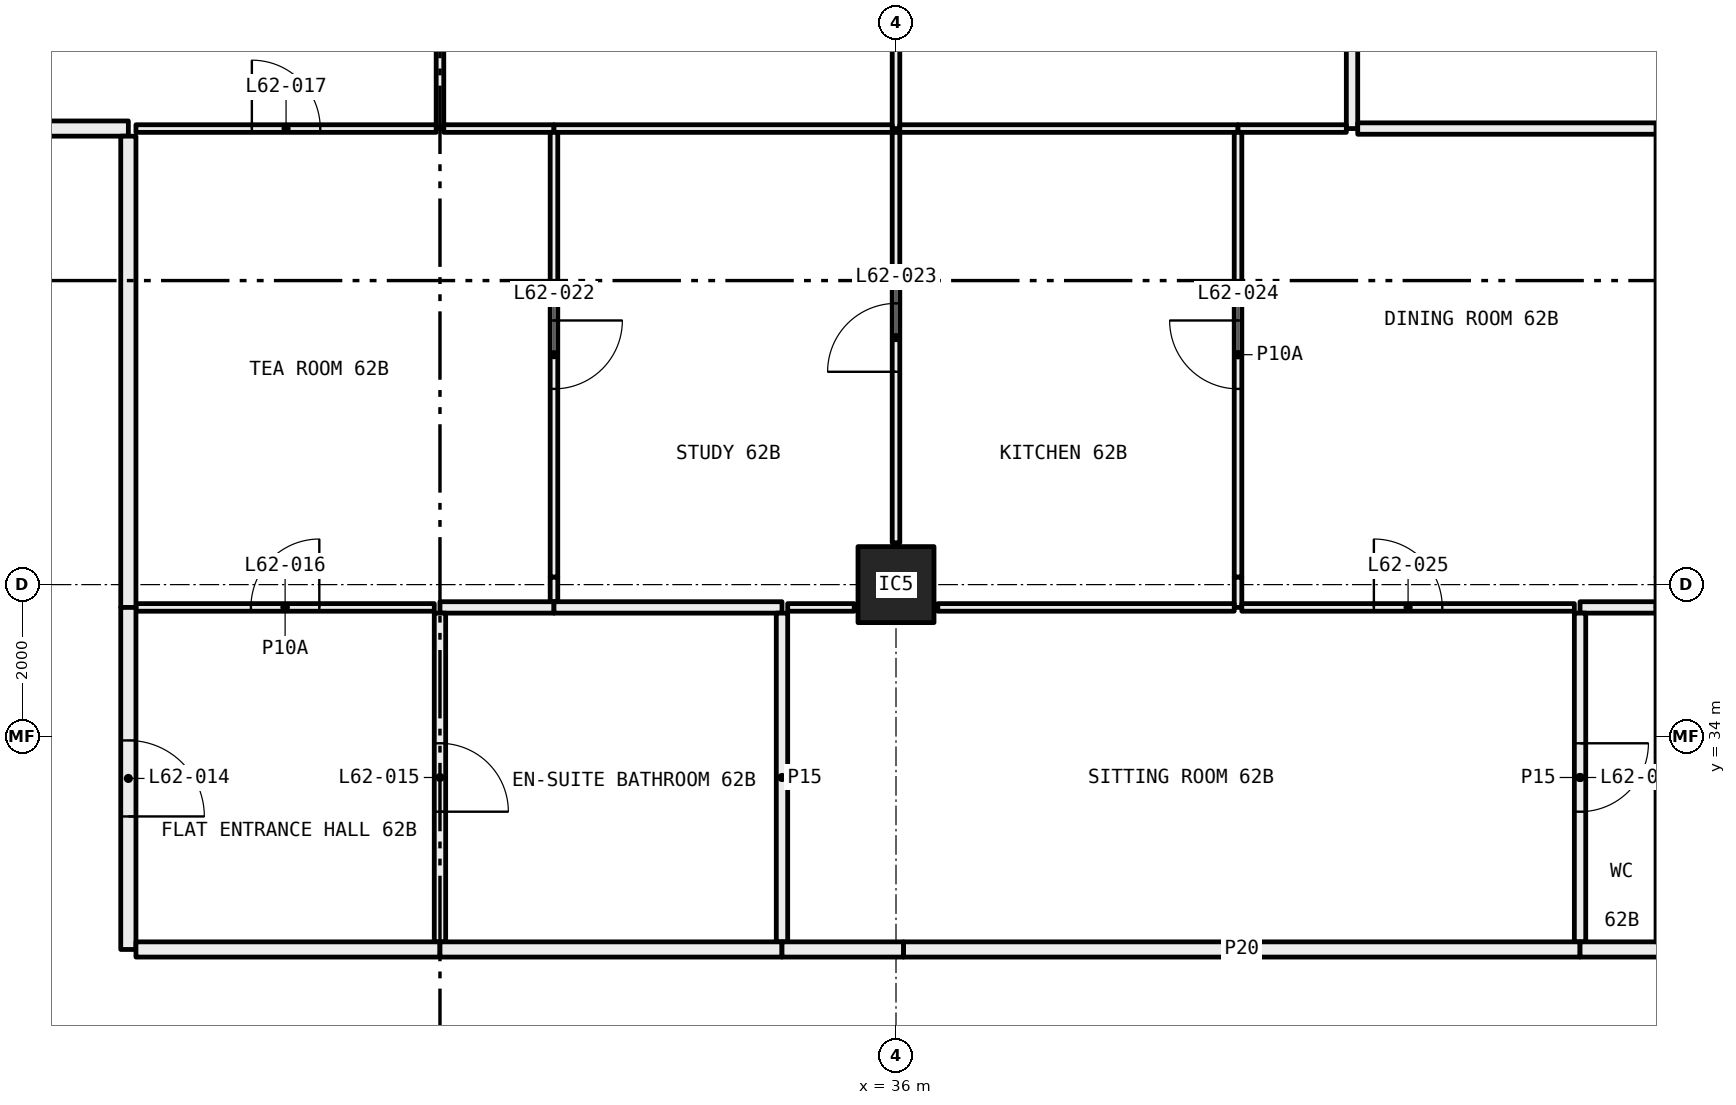
"""IFC4 building model, lengths in metres.
Left out: names, types, materials, properties, quantities, classifications, styles, units other than length and angle.
Written with IfcOpenShell. Run it as: python <this file> out.ifc"""

import sys

from ifc_helpers import new_model, si_unit, direction, frame, frame_2d, origin, origin_2d, place, context, subcontext, project, spatial, rectangle, hollow_rectangle, extrude, element, fill, save


model = new_model("IFC4")
c1 = context("Model", 3, precision=1e-05, world=origin(), true_north=direction((0.0, 1.0)))
c2 = subcontext(c1, "Body", "Model", "MODEL_VIEW")
j1 = project(units=[si_unit("LENGTHUNIT", "METRE"), si_unit("PLANEANGLEUNIT", "RADIAN")], contexts=[c1])
p1 = place(None, origin())
s1 = spatial("IfcSite", under=j1, at=p1, CompositionType="ELEMENT")
p2 = place(p1, origin())
s2 = spatial("IfcBuilding", under=s1, at=p2, CompositionType="ELEMENT")
p3 = place(p2, frame((0.0, 0.0, 231.75)))
s3 = spatial("IfcBuildingStorey", under=s2, at=p3, CompositionType="ELEMENT", Elevation=231.75)
p4 = place(p3, frame((36.0, 36.0, 0.0), z_axis=(0.0, 0.0, 1.0), x_axis=(1.0, 0.0, 0.0)))
e1 = element("IfcColumn", 1, at=p4, inside=s3, PredefinedType="COLUMN", context=c2, shape_type="SweptSolid", body=[
    extrude(hollow_rectangle(XDim=1.0, YDim=1.0, WallThickness=0.04, at=origin_2d()), origin(), (0.0, 0.0, 1.0), 3.05),
])
p5 = place(p3, frame((30.0, 42.0, 0.0), z_axis=(0.0, 0.0, 1.0), x_axis=(0.0, 1.0, 0.0)))
e2 = element("IfcWall", 2, at=p5, inside=s3, PredefinedType="PARTITIONING", context=c2, shape_type="SweptSolid", body=[
    extrude(rectangle(XDim=5.28, YDim=0.1, at=frame_2d((2.64, 0.0))), origin(), (0.0, 0.0, 1.0), 3.05),
])
p6 = place(p5, frame((2.19, 0.0, 0.0)))
e3 = element("IfcOpeningElement", 3, at=p6, cuts=e2, PredefinedType="OPENING", context=c2, shape_type="SweptSolid", body=[
    extrude(rectangle(XDim=0.9, YDim=2.1, at=frame_2d((0.45, 1.05))), frame((0.0, 0.06, 0.0), z_axis=(0.0, -1.0, 0.0), x_axis=(1.0, 0.0, 0.0)), (0.0, 0.0, 1.0), 0.12),
])
p7 = place(p3, frame((26.0, 42.0, 0.0), z_axis=(0.0, 0.0, 1.0), x_axis=(1.0, 0.0, 0.0)))
e4 = element("IfcWall", 4, at=p7, inside=s3, PredefinedType="PARTITIONING", context=c2, shape_type="SweptSolid", body=[
    extrude(rectangle(XDim=3.95, YDim=0.1, at=frame_2d((1.975, 0.0))), origin(), (0.0, 0.0, 1.0), 3.05),
])
p8 = place(p7, frame((1.525, 0.0, 0.0)))
e5 = element("IfcOpeningElement", 5, at=p8, cuts=e4, PredefinedType="OPENING", context=c2, shape_type="SweptSolid", body=[
    extrude(rectangle(XDim=0.9, YDim=2.1, at=frame_2d((0.45, 1.05))), frame((0.0, 0.06, 0.0), z_axis=(0.0, -1.0, 0.0), x_axis=(1.0, 0.0, 0.0)), (0.0, 0.0, 1.0), 0.12),
])
p9 = place(p3, frame((24.0, 42.0, 0.0), z_axis=(0.0, 0.0, 1.0), x_axis=(1.0, 0.0, 0.0)))
e6 = element("IfcWall", 6, at=p9, inside=s3, PredefinedType="PARTITIONING", context=c2, shape_type="SweptSolid", body=[
    extrude(rectangle(XDim=1.9, YDim=0.2, at=frame_2d((0.95, 0.0))), origin(), (0.0, 0.0, 1.0), 3.05),
])
p10 = place(p3, frame((36.0, 42.0, 0.0), z_axis=(0.0, 0.0, 1.0), x_axis=(0.0, 1.0, 0.0)))
e7 = element("IfcWall", 7, at=p10, inside=s3, PredefinedType="PARTITIONING", context=c2, shape_type="SweptSolid", body=[
    extrude(rectangle(XDim=5.28, YDim=0.1, at=frame_2d((2.64, 0.0))), origin(), (0.0, 0.0, 1.0), 2.45),
])
p11 = place(p10, frame((2.19, 0.0, 0.0)))
e8 = element("IfcOpeningElement", 8, at=p11, cuts=e7, PredefinedType="OPENING", context=c2, shape_type="SweptSolid", body=[
    extrude(rectangle(XDim=0.9, YDim=2.1, at=frame_2d((0.45, 1.05))), frame((0.0, 0.06, 0.0), z_axis=(0.0, -1.0, 0.0), x_axis=(1.0, 0.0, 0.0)), (0.0, 0.0, 1.0), 0.12),
])
p12 = place(p3, frame((30.05, 42.0, 0.0), z_axis=(0.0, 0.0, 1.0), x_axis=(1.0, 0.0, 0.0)))
e9 = element("IfcWall", 9, at=p12, inside=s3, PredefinedType="PARTITIONING", context=c2, shape_type="SweptSolid", body=[
    extrude(rectangle(XDim=1.45, YDim=0.1, at=frame_2d((0.725, 0.0))), origin(), (0.0, 0.0, 1.0), 3.05),
])
p13 = place(p3, frame((31.5, 42.0, 0.0), z_axis=(0.0, 0.0, 1.0), x_axis=(1.0, 0.0, 0.0)))
e10 = element("IfcWall", 10, at=p13, inside=s3, PredefinedType="PARTITIONING", context=c2, shape_type="SweptSolid", body=[
    extrude(rectangle(XDim=4.45, YDim=0.1, at=frame_2d((2.225, 0.0))), origin(), (0.0, 0.0, 1.0), 2.45),
])
p14 = place(p3, frame((42.0, 42.0, 0.0), z_axis=(0.0, 0.0, 1.0), x_axis=(0.0, 1.0, 0.0)))
e11 = element("IfcWall", 11, at=p14, inside=s3, PredefinedType="PARTITIONING", context=c2, shape_type="SweptSolid", body=[
    extrude(rectangle(XDim=3.0, YDim=0.15, at=frame_2d((1.5, 0.0))), origin(), (0.0, 0.0, 1.0), 3.05),
])
p15 = place(p14, frame((1.05, 0.0, 0.0)))
e12 = element("IfcOpeningElement", 12, at=p15, cuts=e11, PredefinedType="OPENING", context=c2, shape_type="SweptSolid", body=[
    extrude(rectangle(XDim=0.9, YDim=2.1, at=frame_2d((0.45, 1.05))), frame((0.0, 0.085, 0.0), z_axis=(0.0, -1.0, 0.0), x_axis=(1.0, 0.0, 0.0)), (0.0, 0.0, 1.0), 0.17),
])
p16 = place(p3, frame((36.05, 42.0, 0.0), z_axis=(0.0, 0.0, 1.0), x_axis=(1.0, 0.0, 0.0)))
e13 = element("IfcWall", 13, at=p16, inside=s3, PredefinedType="PARTITIONING", context=c2, shape_type="SweptSolid", body=[
    extrude(rectangle(XDim=4.45, YDim=0.1, at=frame_2d((2.225, 0.0))), origin(), (0.0, 0.0, 1.0), 2.45),
])
p17 = place(p3, frame((40.5, 42.0, 0.0), z_axis=(0.0, 0.0, 1.0), x_axis=(1.0, 0.0, 0.0)))
e14 = element("IfcWall", 14, at=p17, inside=s3, PredefinedType="PARTITIONING", context=c2, shape_type="SweptSolid", body=[
    extrude(rectangle(XDim=1.425, YDim=0.1, at=frame_2d((0.712, 0.0))), origin(), (0.0, 0.0, 1.0), 3.05),
])
p18 = place(p3, frame((42.075, 42.0, 0.0), z_axis=(0.0, 0.0, 1.0), x_axis=(1.0, 0.0, 0.0)))
e15 = element("IfcWall", 15, at=p18, inside=s3, PredefinedType="PARTITIONING", context=c2, shape_type="SweptSolid", body=[
    extrude(rectangle(XDim=3.925, YDim=0.15, at=frame_2d((1.962, 0.0))), origin(), (0.0, 0.0, 1.0), 3.05),
])
p19 = place(p3, frame((31.5, 35.775, 0.0), z_axis=(0.0, 0.0, 1.0), x_axis=(0.0, 1.0, 0.0)))
e16 = element("IfcWall", 16, at=p19, inside=s3, PredefinedType="PARTITIONING", context=c2, shape_type="SweptSolid", body=[
    extrude(rectangle(XDim=0.325, YDim=0.1, at=frame_2d((0.163, 0.0))), origin(), (0.0, 0.0, 1.0), 2.45),
])
p20 = place(p3, frame((31.5, 36.1, 0.0), z_axis=(0.0, 0.0, 1.0), x_axis=(0.0, 1.0, 0.0)))
e17 = element("IfcWall", 17, at=p20, inside=s3, PredefinedType="PARTITIONING", context=c2, shape_type="SweptSolid", body=[
    extrude(rectangle(XDim=5.85, YDim=0.1, at=frame_2d((2.925, 0.0))), origin(), (0.0, 0.0, 1.0), 3.05),
])
p21 = place(p20, frame((2.475, 0.0, 0.0)))
e18 = element("IfcOpeningElement", 18, at=p21, cuts=e17, PredefinedType="OPENING", context=c2, shape_type="SweptSolid", body=[
    extrude(rectangle(XDim=0.9, YDim=2.1, at=frame_2d((0.45, 1.05))), frame((0.0, 0.06, 0.0), z_axis=(0.0, -1.0, 0.0), x_axis=(1.0, 0.0, 0.0)), (0.0, 0.0, 1.0), 0.12),
])
p22 = place(p3, frame((26.0, 35.7, 0.0), z_axis=(0.0, 0.0, 1.0), x_axis=(1.0, 0.0, 0.0)))
e19 = element("IfcWall", 19, at=p22, inside=s3, PredefinedType="PARTITIONING", context=c2, shape_type="SweptSolid", body=[
    extrude(rectangle(XDim=3.925, YDim=0.1, at=frame_2d((1.962, 0.0))), origin(), (0.0, 0.0, 1.0), 3.05),
])
p23 = place(p22, frame((1.512, 0.0, 0.0)))
e20 = element("IfcOpeningElement", 20, at=p23, cuts=e19, PredefinedType="OPENING", context=c2, shape_type="SweptSolid", body=[
    extrude(rectangle(XDim=0.9, YDim=2.1, at=frame_2d((0.45, 1.05))), frame((0.0, 0.06, 0.0), z_axis=(0.0, -1.0, 0.0), x_axis=(1.0, 0.0, 0.0)), (0.0, 0.0, 1.0), 0.12),
])
p24 = place(p3, frame((30.0, 35.7, 0.0), z_axis=(0.0, 0.0, 1.0), x_axis=(1.0, 0.0, 0.0)))
e21 = element("IfcWall", 21, at=p24, inside=s3, PredefinedType="PARTITIONING", context=c2, shape_type="SweptSolid", body=[
    extrude(rectangle(XDim=1.5, YDim=0.15, at=frame_2d((0.75, 0.0))), origin(), (0.0, 0.0, 1.0), 3.05),
])
p25 = place(p3, frame((25.9, 41.9, 0.0), z_axis=(0.0, 0.0, 1.0), x_axis=(0.0, -1.0, 0.0)))
e22 = element("IfcWall", 22, at=p25, inside=s3, PredefinedType="PARTITIONING", context=c2, shape_type="SweptSolid", body=[
    extrude(rectangle(XDim=6.2, YDim=0.2, at=frame_2d((3.1, 0.0))), origin(), (0.0, 0.0, 1.0), 2.45),
])
p26 = place(p3, frame((36.0, 36.55, 0.0), z_axis=(0.0, 0.0, 1.0), x_axis=(0.0, 1.0, 0.0)))
e23 = element("IfcWall", 23, at=p26, inside=s3, PredefinedType="PARTITIONING", context=c2, shape_type="SweptSolid", body=[
    extrude(rectangle(XDim=5.4, YDim=0.1, at=frame_2d((2.7, 0.0))), origin(), (0.0, 0.0, 1.0), 2.45),
])
p27 = place(p26, frame((2.25, 0.0, 0.0)))
e24 = element("IfcOpeningElement", 24, at=p27, cuts=e23, PredefinedType="OPENING", context=c2, shape_type="SweptSolid", body=[
    extrude(rectangle(XDim=0.9, YDim=2.1, at=frame_2d((0.45, 1.05))), frame((0.0, 0.06, 0.0), z_axis=(0.0, -1.0, 0.0), x_axis=(1.0, 0.0, 0.0)), (0.0, 0.0, 1.0), 0.12),
])
p28 = place(p3, frame((31.5, 35.7, 0.0), z_axis=(0.0, 0.0, 1.0), x_axis=(1.0, 0.0, 0.0)))
e25 = element("IfcWall", 25, at=p28, inside=s3, PredefinedType="PARTITIONING", context=c2, shape_type="SweptSolid", body=[
    extrude(rectangle(XDim=3.0, YDim=0.15, at=frame_2d((1.5, 0.0))), origin(), (0.0, 0.0, 1.0), 3.05),
])
p29 = place(p3, frame((34.575, 35.7, 0.0), z_axis=(0.0, 0.0, 1.0), x_axis=(1.0, 0.0, 0.0)))
e26 = element("IfcWall", 26, at=p29, inside=s3, PredefinedType="PARTITIONING", context=c2, shape_type="SweptSolid", body=[
    extrude(rectangle(XDim=0.875, YDim=0.1, at=frame_2d((0.438, 0.0))), origin(), (0.0, 0.0, 1.0), 3.05),
])
p30 = place(p3, frame((40.5, 35.7, 0.0), z_axis=(0.0, 0.0, 1.0), x_axis=(0.0, 1.0, 0.0)))
e27 = element("IfcWall", 27, at=p30, inside=s3, PredefinedType="PARTITIONING", context=c2, shape_type="SweptSolid", body=[
    extrude(rectangle(XDim=0.4, YDim=0.1, at=frame_2d((0.2, 0.0))), origin(), (0.0, 0.0, 1.0), 2.45),
])
p31 = place(p3, frame((40.5, 36.1, 0.0), z_axis=(0.0, 0.0, 1.0), x_axis=(0.0, 1.0, 0.0)))
e28 = element("IfcWall", 28, at=p31, inside=s3, PredefinedType="PARTITIONING", context=c2, shape_type="SweptSolid", body=[
    extrude(rectangle(XDim=5.85, YDim=0.1, at=frame_2d((2.925, 0.0))), origin(), (0.0, 0.0, 1.0), 3.05),
])
p32 = place(p31, frame((2.475, 0.0, 0.0)))
e29 = element("IfcOpeningElement", 29, at=p32, cuts=e28, PredefinedType="OPENING", context=c2, shape_type="SweptSolid", body=[
    extrude(rectangle(XDim=0.9, YDim=2.1, at=frame_2d((0.45, 1.05))), frame((0.0, 0.06, 0.0), z_axis=(0.0, -1.0, 0.0), x_axis=(1.0, 0.0, 0.0)), (0.0, 0.0, 1.0), 0.12),
])
p33 = place(p3, frame((36.55, 35.7, 0.0), z_axis=(0.0, 0.0, 1.0), x_axis=(1.0, 0.0, 0.0)))
e30 = element("IfcWall", 30, at=p33, inside=s3, PredefinedType="PARTITIONING", context=c2, shape_type="SweptSolid", body=[
    extrude(rectangle(XDim=3.9, YDim=0.1, at=frame_2d((1.95, 0.0))), origin(), (0.0, 0.0, 1.0), 3.05),
])
p34 = place(p3, frame((40.55, 35.7, 0.0), z_axis=(0.0, 0.0, 1.0), x_axis=(1.0, 0.0, 0.0)))
e31 = element("IfcWall", 31, at=p34, inside=s3, PredefinedType="PARTITIONING", context=c2, shape_type="SweptSolid", body=[
    extrude(rectangle(XDim=4.375, YDim=0.1, at=frame_2d((2.188, 0.0))), origin(), (0.0, 0.0, 1.0), 3.05),
])
p35 = place(p34, frame((1.738, 0.0, 0.0)))
e32 = element("IfcOpeningElement", 32, at=p35, cuts=e31, PredefinedType="OPENING", context=c2, shape_type="SweptSolid", body=[
    extrude(rectangle(XDim=0.9, YDim=2.1, at=frame_2d((0.45, 1.05))), frame((0.0, 0.06, 0.0), z_axis=(0.0, -1.0, 0.0), x_axis=(1.0, 0.0, 0.0)), (0.0, 0.0, 1.0), 0.12),
])
p36 = place(p3, frame((45.0, 35.7, 0.0), z_axis=(0.0, 0.0, 1.0), x_axis=(1.0, 0.0, 0.0)))
e33 = element("IfcWall", 33, at=p36, inside=s3, PredefinedType="PARTITIONING", context=c2, shape_type="SweptSolid", body=[
    extrude(rectangle(XDim=1.0, YDim=0.15, at=frame_2d((0.5, 0.0))), origin(), (0.0, 0.0, 1.0), 3.05),
])
p37 = place(p3, frame((30.0, 31.3, 0.0), z_axis=(0.0, 0.0, 1.0), x_axis=(0.0, 1.0, 0.0)))
e34 = element("IfcWall", 34, at=p37, inside=s3, PredefinedType="PARTITIONING", context=c2, shape_type="SweptSolid", body=[
    extrude(rectangle(XDim=4.325, YDim=0.15, at=frame_2d((2.163, 0.0))), origin(), (0.0, 0.0, 1.0), 3.05),
])
p38 = place(p37, frame((1.712, 0.0, 0.0)))
e35 = element("IfcOpeningElement", 35, at=p38, cuts=e34, PredefinedType="OPENING", context=c2, shape_type="SweptSolid", body=[
    extrude(rectangle(XDim=0.9, YDim=2.1, at=frame_2d((0.45, 1.05))), frame((0.0, 0.085, 0.0), z_axis=(0.0, -1.0, 0.0), x_axis=(1.0, 0.0, 0.0)), (0.0, 0.0, 1.0), 0.17),
])
p39 = place(p3, frame((25.9, 35.7, 0.0), z_axis=(0.0, 0.0, 1.0), x_axis=(0.0, -1.0, 0.0)))
e36 = element("IfcWall", 36, at=p39, inside=s3, PredefinedType="PARTITIONING", context=c2, shape_type="SweptSolid", body=[
    extrude(rectangle(XDim=4.5, YDim=0.2, at=frame_2d((2.25, 0.0))), origin(), (0.0, 0.0, 1.0), 3.05),
])
p40 = place(p39, frame((1.75, 0.0, 0.0)))
e37 = element("IfcOpeningElement", 37, at=p40, cuts=e36, PredefinedType="OPENING", context=c2, shape_type="SweptSolid", body=[
    extrude(rectangle(XDim=1.0, YDim=2.1, at=frame_2d((0.5, 1.05))), frame((0.0, 0.11, 0.0), z_axis=(0.0, -1.0, 0.0), x_axis=(1.0, 0.0, 0.0)), (0.0, 0.0, 1.0), 0.22),
])
p41 = place(p3, frame((26.0, 31.2, 0.0), z_axis=(0.0, 0.0, 1.0), x_axis=(1.0, 0.0, 0.0)))
e38 = element("IfcWall", 38, at=p41, inside=s3, PredefinedType="PARTITIONING", context=c2, shape_type="SweptSolid", body=[
    extrude(rectangle(XDim=4.0, YDim=0.2, at=frame_2d((2.0, 0.0))), origin(), (0.0, 0.0, 1.0), 3.05),
])
p42 = place(p3, frame((34.5, 31.3, 0.0), z_axis=(0.0, 0.0, 1.0), x_axis=(0.0, 1.0, 0.0)))
e39 = element("IfcWall", 39, at=p42, inside=s3, PredefinedType="PARTITIONING", context=c2, shape_type="SweptSolid", body=[
    extrude(rectangle(XDim=4.325, YDim=0.15, at=frame_2d((2.163, 0.0))), origin(), (0.0, 0.0, 1.0), 3.05),
])
p43 = place(p3, frame((30.0, 31.2, 0.0), z_axis=(0.0, 0.0, 1.0), x_axis=(1.0, 0.0, 0.0)))
e40 = element("IfcWall", 40, at=p43, inside=s3, PredefinedType="PARTITIONING", context=c2, shape_type="SweptSolid", body=[
    extrude(rectangle(XDim=4.5, YDim=0.2, at=frame_2d((2.25, 0.0))), origin(), (0.0, 0.0, 1.0), 3.05),
])
p44 = place(p3, frame((45.0, 31.3, 0.0), z_axis=(0.0, 0.0, 1.0), x_axis=(0.0, 1.0, 0.0)))
e41 = element("IfcWall", 41, at=p44, inside=s3, PredefinedType="PARTITIONING", context=c2, shape_type="SweptSolid", body=[
    extrude(rectangle(XDim=4.325, YDim=0.15, at=frame_2d((2.163, 0.0))), origin(), (0.0, 0.0, 1.0), 3.05),
])
p45 = place(p44, frame((1.712, 0.0, 0.0)))
e42 = element("IfcOpeningElement", 42, at=p45, cuts=e41, PredefinedType="OPENING", context=c2, shape_type="SweptSolid", body=[
    extrude(rectangle(XDim=0.9, YDim=2.1, at=frame_2d((0.45, 1.05))), frame((0.0, 0.085, 0.0), z_axis=(0.0, -1.0, 0.0), x_axis=(1.0, 0.0, 0.0)), (0.0, 0.0, 1.0), 0.17),
])
p46 = place(p3, frame((34.5, 31.2, 0.0), z_axis=(0.0, 0.0, 1.0), x_axis=(1.0, 0.0, 0.0)))
e43 = element("IfcWall", 43, at=p46, inside=s3, PredefinedType="PARTITIONING", context=c2, shape_type="SweptSolid", body=[
    extrude(rectangle(XDim=1.6, YDim=0.2, at=frame_2d((0.8, 0.0))), origin(), (0.0, 0.0, 1.0), 2.45),
])
p47 = place(p3, frame((36.1, 31.2, 0.0), z_axis=(0.0, 0.0, 1.0), x_axis=(1.0, 0.0, 0.0)))
e44 = element("IfcWall", 44, at=p47, inside=s3, PredefinedType="PARTITIONING", context=c2, shape_type="SweptSolid", body=[
    extrude(rectangle(XDim=8.9, YDim=0.2, at=frame_2d((4.45, 0.0))), origin(), (0.0, 0.0, 1.0), 3.05),
])
p48 = place(p3, frame((45.0, 31.2, 0.0), z_axis=(0.0, 0.0, 1.0), x_axis=(1.0, 0.0, 0.0)))
e45 = element("IfcWall", 45, at=p48, inside=s3, PredefinedType="PARTITIONING", context=c2, shape_type="SweptSolid", body=[
    extrude(rectangle(XDim=1.1, YDim=0.2, at=frame_2d((0.55, 0.0))), origin(), (0.0, 0.0, 1.0), 3.05),
])
p49 = place(p40, origin())
e46 = element("IfcDoor", 46, at=p49, inside=s3, OperationType="SINGLE_SWING_LEFT", PredefinedType="DOOR", context=c2, shape_type="SweptSolid", body=[
    extrude(rectangle(XDim=1.0, YDim=2.1, at=frame_2d((0.5, 1.05))), frame((0.0, 0.025, 0.0), z_axis=(0.0, -1.0, 0.0), x_axis=(1.0, 0.0, 0.0)), (0.0, 0.0, 1.0), 0.05),
])
fill(e37, e46)
p50 = place(p38, frame((0.9, 0.0, 0.0), x_axis=(-1.0, 0.0, 0.0)))
e47 = element("IfcDoor", 47, at=p50, inside=s3, OperationType="SINGLE_SWING_LEFT", PredefinedType="DOOR", context=c2, shape_type="SweptSolid", body=[
    extrude(rectangle(XDim=0.9, YDim=2.1, at=frame_2d((0.45, 1.05))), frame((0.0, 0.025, 0.0), z_axis=(0.0, -1.0, 0.0), x_axis=(1.0, 0.0, 0.0)), (0.0, 0.0, 1.0), 0.05),
])
fill(e35, e47)
p51 = place(p23, origin())
e48 = element("IfcDoor", 48, at=p51, inside=s3, OperationType="SINGLE_SWING_LEFT", PredefinedType="DOOR", context=c2, shape_type="SweptSolid", body=[
    extrude(rectangle(XDim=0.9, YDim=2.1, at=frame_2d((0.45, 1.05))), frame((0.0, 0.025, 0.0), z_axis=(0.0, -1.0, 0.0), x_axis=(1.0, 0.0, 0.0)), (0.0, 0.0, 1.0), 0.05),
])
fill(e20, e48)
p52 = place(p8, origin())
e49 = element("IfcDoor", 49, at=p52, inside=s3, OperationType="SINGLE_SWING_RIGHT", PredefinedType="DOOR", context=c2, shape_type="SweptSolid", body=[
    extrude(rectangle(XDim=0.9, YDim=2.1, at=frame_2d((0.45, 1.05))), frame((0.0, 0.025, 0.0), z_axis=(0.0, -1.0, 0.0), x_axis=(1.0, 0.0, 0.0)), (0.0, 0.0, 1.0), 0.05),
])
fill(e5, e49)
p53 = place(p21, frame((0.9, 0.0, 0.0), x_axis=(-1.0, 0.0, 0.0)))
e50 = element("IfcDoor", 50, at=p53, inside=s3, OperationType="SINGLE_SWING_RIGHT", PredefinedType="DOOR", context=c2, shape_type="SweptSolid", body=[
    extrude(rectangle(XDim=0.9, YDim=2.1, at=frame_2d((0.45, 1.05))), frame((0.0, 0.025, 0.0), z_axis=(0.0, -1.0, 0.0), x_axis=(1.0, 0.0, 0.0)), (0.0, 0.0, 1.0), 0.05),
])
fill(e18, e50)
p54 = place(p27, origin())
e51 = element("IfcDoor", 51, at=p54, inside=s3, OperationType="SINGLE_SWING_RIGHT", PredefinedType="DOOR", context=c2, shape_type="SweptSolid", body=[
    extrude(rectangle(XDim=0.9, YDim=2.1, at=frame_2d((0.45, 1.05))), frame((0.0, 0.025, 0.0), z_axis=(0.0, -1.0, 0.0), x_axis=(1.0, 0.0, 0.0)), (0.0, 0.0, 1.0), 0.05),
])
fill(e24, e51)
p55 = place(p32, origin())
e52 = element("IfcDoor", 52, at=p55, inside=s3, OperationType="SINGLE_SWING_LEFT", PredefinedType="DOOR", context=c2, shape_type="SweptSolid", body=[
    extrude(rectangle(XDim=0.9, YDim=2.1, at=frame_2d((0.45, 1.05))), frame((0.0, 0.025, 0.0), z_axis=(0.0, -1.0, 0.0), x_axis=(1.0, 0.0, 0.0)), (0.0, 0.0, 1.0), 0.05),
])
fill(e29, e52)
p56 = place(p35, origin())
e53 = element("IfcDoor", 53, at=p56, inside=s3, OperationType="SINGLE_SWING_RIGHT", PredefinedType="DOOR", context=c2, shape_type="SweptSolid", body=[
    extrude(rectangle(XDim=0.9, YDim=2.1, at=frame_2d((0.45, 1.05))), frame((0.0, 0.025, 0.0), z_axis=(0.0, -1.0, 0.0), x_axis=(1.0, 0.0, 0.0)), (0.0, 0.0, 1.0), 0.05),
])
fill(e32, e53)
p57 = place(p45, frame((0.9, 0.0, 0.0), x_axis=(-1.0, 0.0, 0.0)))
e54 = element("IfcDoor", 54, at=p57, inside=s3, OperationType="SINGLE_SWING_RIGHT", PredefinedType="DOOR", context=c2, shape_type="SweptSolid", body=[
    extrude(rectangle(XDim=0.9, YDim=2.1, at=frame_2d((0.45, 1.05))), frame((0.0, 0.025, 0.0), z_axis=(0.0, -1.0, 0.0), x_axis=(1.0, 0.0, 0.0)), (0.0, 0.0, 1.0), 0.05),
])
fill(e42, e54)
save(model, sys.argv[1])
